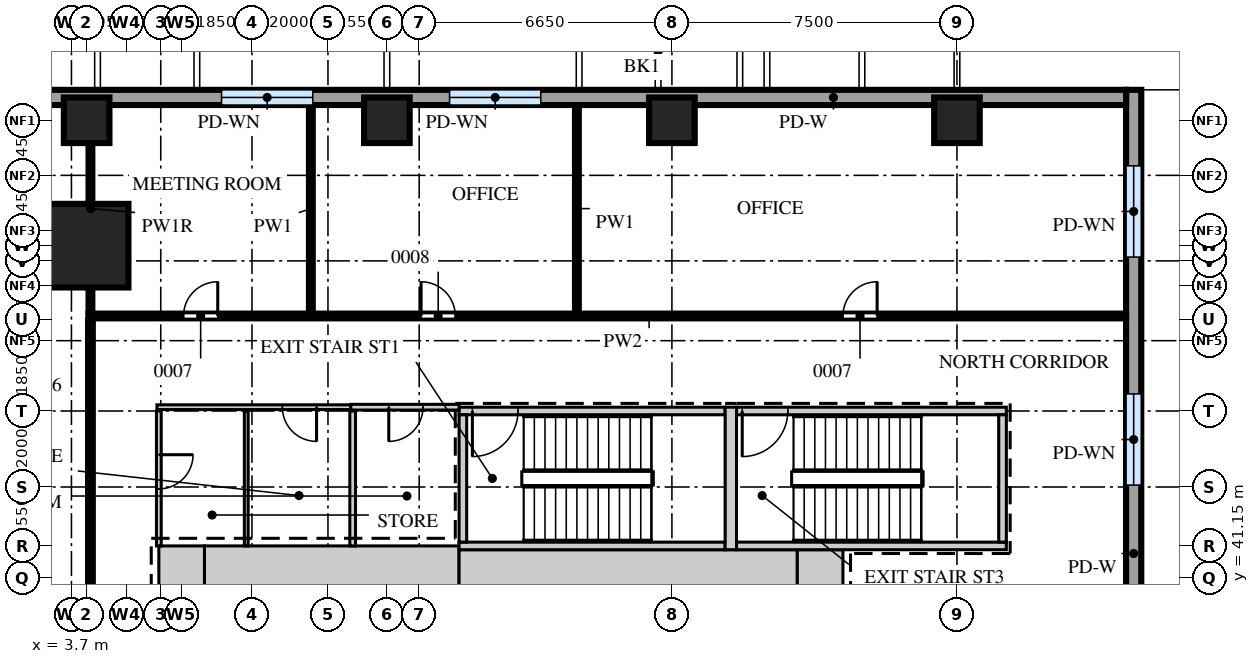
"""IFC4 building model, lengths in metres.
Left out: names, types, materials, properties, quantities, classifications, styles, units other than length and angle.
Written with IfcOpenShell. Run it as: python <this file> out.ifc"""

import sys

from ifc_helpers import new_model, si_unit, direction, frame, frame_2d, origin, origin_2d, place, context, subcontext, project, spatial, rectangle, extrude, source, transform, mapped, element, fill, save


model = new_model("IFC4")
c1 = context("Model", 3, precision=1e-05, world=origin(), true_north=direction((0.0, 1.0)))
c2 = subcontext(c1, "Body", "Model", "MODEL_VIEW")
j1 = project(units=[si_unit("LENGTHUNIT", "METRE"), si_unit("PLANEANGLEUNIT", "RADIAN")], contexts=[c1])
p1 = place(None, origin())
s1 = spatial("IfcSite", under=j1, at=p1, CompositionType="ELEMENT")
p2 = place(p1, origin())
s2 = spatial("IfcBuilding", under=s1, at=p2, CompositionType="ELEMENT")
p3 = place(p2, frame((0.0, 0.0, 28.5)))
s3 = spatial("IfcBuildingStorey", under=s2, at=p3, CompositionType="ELEMENT", Elevation=28.5)
m1 = source(origin(), c2, "Body", "SweptSolid", [
    extrude(rectangle(XDim=6.7, YDim=1.2, at=frame_2d((3.35, 0.0))), origin(), (0.0, 0.0, 1.0), 4.0),
])
p4 = place(p3, frame((7.2, 41.4, 0.0), z_axis=(0.0, 0.0, 1.0), x_axis=(1.0, 0.0, 0.0)))
e1 = element("IfcWall", 1, at=p4, inside=s3, PredefinedType="SHEAR", context=c2, shape_type="MappedRepresentation", body=[
    mapped(m1, transform((0.0, 0.0, 0.0))),
])
m2 = source(origin(), c2, "Body", "SweptSolid", [
    extrude(rectangle(XDim=8.9, YDim=1.1, at=frame_2d((4.45, 0.0))), origin(), (0.0, 0.0, 1.0), 4.0),
])
p5 = place(p3, frame((13.9, 41.35, 0.0), z_axis=(0.0, 0.0, 1.0), x_axis=(1.0, 0.0, 0.0)))
e2 = element("IfcWall", 2, at=p5, inside=s3, PredefinedType="SHEAR", context=c2, shape_type="MappedRepresentation", body=[
    mapped(m2, transform((0.0, 0.0, 0.0))),
])
m3 = source(origin(), c2, "Body", "SweptSolid", [
    extrude(rectangle(XDim=1.2, YDim=1.1, at=frame_2d((0.6, 0.0))), origin(), (0.0, 0.0, 1.0), 4.0),
])
p6 = place(p3, frame((22.8, 41.35, 0.0), z_axis=(0.0, 0.0, 1.0), x_axis=(1.0, 0.0, 0.0)))
e3 = element("IfcWall", 3, at=p6, inside=s3, PredefinedType="SHEAR", context=c2, shape_type="MappedRepresentation", body=[
    mapped(m3, transform((0.0, 0.0, 0.0))),
])
m4 = source(origin(), c2, "Body", "SweptSolid", [
    extrude(rectangle(XDim=1.2, YDim=1.2, at=frame_2d((0.6, 0.0))), origin(), (0.0, 0.0, 1.0), 4.0),
])
p7 = place(p3, frame((6.0, 41.4, 0.0), z_axis=(0.0, 0.0, 1.0), x_axis=(1.0, 0.0, 0.0)))
e4 = element("IfcWall", 4, at=p7, inside=s3, PredefinedType="SHEAR", context=c2, shape_type="MappedRepresentation", body=[
    mapped(m4, transform((0.0, 0.0, 0.0))),
])
m5 = source(origin(), c2, "Body", "SweptSolid", [
    extrude(rectangle(XDim=7.0, YDim=0.2, at=frame_2d((3.5, 0.0))), origin(), (0.0, 0.0, 1.0), 4.0),
])
p8 = place(p3, frame((13.9, 45.55, 0.0), z_axis=(0.0, 0.0, 1.0), x_axis=(1.0, 0.0, 0.0)))
e5 = element("IfcWall", 5, at=p8, inside=s3, PredefinedType="SHEAR", context=c2, shape_type="MappedRepresentation", body=[
    mapped(m5, transform((0.0, 0.0, 0.0))),
])
m6 = source(origin(), c2, "Body", "SweptSolid", [
    extrude(rectangle(XDim=1.2, YDim=2.1, at=frame_2d((0.6, 1.05))), frame((0.0, 0.11, 0.0), z_axis=(0.0, -1.0, 0.0), x_axis=(1.0, 0.0, 0.0)), (0.0, 0.0, 1.0), 0.22),
])
p9 = place(p8, frame((0.35, 0.0, 0.0)))
e6 = element("IfcOpeningElement", 6, at=p9, cuts=e5, PredefinedType="OPENING", context=c2, shape_type="MappedRepresentation", body=[
    mapped(m6, transform((0.0, 0.0, 0.0))),
])
p10 = place(p3, frame((13.9, 42.0, 0.0), z_axis=(0.0, 0.0, 1.0), x_axis=(1.0, 0.0, 0.0)))
e7 = element("IfcWall", 7, at=p10, inside=s3, PredefinedType="SHEAR", context=c2, shape_type="MappedRepresentation", body=[
    mapped(m5, transform((0.0, 0.0, 0.0))),
])
m7 = source(origin(), c2, "Body", "SweptSolid", [
    extrude(rectangle(XDim=7.1, YDim=0.2, at=frame_2d((3.55, 0.0))), origin(), (0.0, 0.0, 1.0), 4.0),
])
p11 = place(p3, frame((21.2, 45.55, 0.0), z_axis=(0.0, 0.0, 1.0), x_axis=(1.0, 0.0, 0.0)))
e8 = element("IfcWall", 8, at=p11, inside=s3, PredefinedType="SHEAR", context=c2, shape_type="MappedRepresentation", body=[
    mapped(m7, transform((0.0, 0.0, 0.0))),
])
p12 = place(p11, frame((0.15, 0.0, 0.0)))
e9 = element("IfcOpeningElement", 9, at=p12, cuts=e8, PredefinedType="OPENING", context=c2, shape_type="MappedRepresentation", body=[
    mapped(m6, transform((0.0, 0.0, 0.0))),
])
p13 = place(p3, frame((21.2, 42.0, 0.0), z_axis=(0.0, 0.0, 1.0), x_axis=(1.0, 0.0, 0.0)))
e10 = element("IfcWall", 10, at=p13, inside=s3, PredefinedType="SHEAR", context=c2, shape_type="MappedRepresentation", body=[
    mapped(m7, transform((0.0, 0.0, 0.0))),
])
m8 = source(origin(), c2, "Body", "SweptSolid", [
    extrude(rectangle(XDim=3.75, YDim=0.3, at=frame_2d((1.875, 0.0))), origin(), (0.0, 0.0, 1.0), 4.0),
])
p14 = place(p3, frame((21.05, 41.9, 0.0), z_axis=(0.0, 0.0, 1.0), x_axis=(0.0, 1.0, 0.0)))
e11 = element("IfcWall", 11, at=p14, inside=s3, PredefinedType="SHEAR", context=c2, shape_type="MappedRepresentation", body=[
    mapped(m8, transform((0.0, 0.0, 0.0))),
])
m9 = source(origin(), c2, "Body", "SweptSolid", [
    extrude(rectangle(XDim=3.35, YDim=0.2, at=frame_2d((1.675, 0.0))), origin(), (0.0, 0.0, 1.0), 4.0),
])
for number, where, z_axis, x_axis in (
    (12, (14.0, 42.1, 0.0), (0.0, 0.0, 1.0), (0.0, 1.0, 0.0)),
    (13, (28.2, 42.1, 0.0), (0.0, 0.0, 1.0), (0.0, 1.0, 0.0)),
):
    element("IfcWall", number, at=place(p3, frame(where, z_axis=z_axis, x_axis=x_axis)), inside=s3, PredefinedType="SHEAR", context=c2, shape_type="MappedRepresentation", body=[
        mapped(m9, transform((0.0, 0.0, 0.0))),
    ])
m10 = source(origin(), c2, "Body", "SweptSolid", [
    extrude(rectangle(XDim=2.2, YDim=2.2, at=origin_2d()), origin(), (0.0, 0.0, 1.0), 4.5),
])
p15 = place(p3, frame((4.1, 49.9, 0.0), z_axis=(0.0, 0.0, 1.0), x_axis=(1.0, 0.0, 0.0)))
e14 = element("IfcColumn", 14, at=p15, inside=s3, PredefinedType="COLUMN", context=c2, shape_type="MappedRepresentation", body=[
    mapped(m10, transform((0.0, 0.0, 0.0))),
])
m11 = source(origin(), c2, "Body", "SweptSolid", [
    extrude(rectangle(XDim=1.2, YDim=1.2, at=origin_2d()), origin(), (0.0, 0.0, 1.0), 4.0),
])
for number, where, z_axis, x_axis in (
    (15, (4.1, 53.2, 0.0), (0.0, 0.0, 1.0), (1.0, 0.0, 0.0)),
    (16, (12.0, 53.2, 0.0), (0.0, 0.0, 1.0), (1.0, 0.0, 0.0)),
    (17, (19.5, 53.2, 0.0), (0.0, 0.0, 1.0), (1.0, 0.0, 0.0)),
    (18, (27.0, 53.2, 0.0), (0.0, 0.0, 1.0), (1.0, 0.0, 0.0)),
):
    element("IfcColumn", number, at=place(p3, frame(where, z_axis=z_axis, x_axis=x_axis)), inside=s3, PredefinedType="COLUMN", context=c2, shape_type="MappedRepresentation", body=[
        mapped(m11, transform((0.0, 0.0, 0.0))),
    ])
m12 = source(origin(), c2, "Body", "SweptSolid", [
    extrude(rectangle(XDim=18.4, YDim=0.4, at=frame_2d((9.2, 0.0))), origin(), (0.0, 0.0, 1.0), 4.2),
])
p16 = place(p3, frame((31.65, 35.6, 0.0), z_axis=(0.0, 0.0, 1.0), x_axis=(0.0, 1.0, 0.0)))
e19 = element("IfcWall", 19, at=p16, inside=s3, PredefinedType="SOLIDWALL", context=c2, shape_type="MappedRepresentation", body=[
    mapped(m12, transform((0.0, 0.0, 0.0))),
])
m13 = source(origin(), c2, "Body", "SweptSolid", [
    extrude(rectangle(XDim=2.4, YDim=2.4, at=frame_2d((1.2, 1.2))), frame((0.0, 0.21, 0.0), z_axis=(0.0, -1.0, 0.0), x_axis=(1.0, 0.0, 0.0)), (0.0, 0.0, 1.0), 0.42),
])
p17 = place(p16, frame((2.0, 0.0, 1.0)))
e20 = element("IfcOpeningElement", 20, at=p17, cuts=e19, PredefinedType="OPENING", context=c2, shape_type="MappedRepresentation", body=[
    mapped(m13, transform((0.0, 0.0, 0.0))),
])
p18 = place(p16, frame((8.0, 0.0, 1.0)))
e21 = element("IfcOpeningElement", 21, at=p18, cuts=e19, PredefinedType="OPENING", context=c2, shape_type="MappedRepresentation", body=[
    mapped(m13, transform((0.0, 0.0, 0.0))),
])
p19 = place(p16, frame((14.0, 0.0, 1.0)))
e22 = element("IfcOpeningElement", 22, at=p19, cuts=e19, PredefinedType="OPENING", context=c2, shape_type="MappedRepresentation", body=[
    mapped(m13, transform((0.0, 0.0, 0.0))),
])
m14 = source(origin(), c2, "Body", "SweptSolid", [
    extrude(rectangle(XDim=33.24, YDim=0.4, at=frame_2d((16.62, 0.0))), origin(), (0.0, 0.0, 1.0), 4.2),
])
p20 = place(p3, frame((31.45, 53.8, 0.0), z_axis=(0.0, 0.0, 1.0), x_axis=(-1.0, 0.0, 0.0)))
e23 = element("IfcWall", 23, at=p20, inside=s3, PredefinedType="SOLIDWALL", context=c2, shape_type="MappedRepresentation", body=[
    mapped(m14, transform((0.0, 0.0, 0.0))),
])
p21 = place(p20, frame((15.4, 0.0, 1.0)))
e24 = element("IfcOpeningElement", 24, at=p21, cuts=e23, PredefinedType="OPENING", context=c2, shape_type="MappedRepresentation", body=[
    mapped(m13, transform((0.0, 0.0, 0.0))),
])
p22 = place(p20, frame((21.4, 0.0, 1.0)))
e25 = element("IfcOpeningElement", 25, at=p22, cuts=e23, PredefinedType="OPENING", context=c2, shape_type="MappedRepresentation", body=[
    mapped(m13, transform((0.0, 0.0, 0.0))),
])
m15 = source(origin(), c2, "Body", "SweptSolid", [
    extrude(rectangle(XDim=41.8, YDim=0.125, at=frame_2d((20.9, 0.0))), origin(), (0.0, 0.0, 1.0), 4.0),
])
p23 = place(p3, frame((4.2, 6.15, 0.0), z_axis=(0.0, 0.0, 1.0), x_axis=(0.0, 1.0, 0.0)))
e26 = element("IfcWall", 26, at=p23, inside=s3, PredefinedType="PARTITIONING", context=c2, shape_type="MappedRepresentation", body=[
    mapped(m15, transform((0.0, 0.0, 0.0))),
])
m16 = source(origin(), c2, "Body", "SweptSolid", [
    extrude(rectangle(XDim=1.2, YDim=2.1, at=frame_2d((0.6, 1.05))), frame((0.0, 0.073, 0.0), z_axis=(0.0, -1.0, 0.0), x_axis=(1.0, 0.0, 0.0)), (0.0, 0.0, 1.0), 0.145),
])
p24 = place(p23, frame((9.45, 0.0, 0.0)))
e27 = element("IfcOpeningElement", 27, at=p24, cuts=e26, PredefinedType="OPENING", context=c2, shape_type="MappedRepresentation", body=[
    mapped(m16, transform((0.0, 0.0, 0.0))),
])
p25 = place(p23, frame((28.05, 0.0, 0.0)))
e28 = element("IfcOpeningElement", 28, at=p25, cuts=e26, PredefinedType="OPENING", context=c2, shape_type="MappedRepresentation", body=[
    mapped(m16, transform((0.0, 0.0, 0.0))),
])
m17 = source(origin(), c2, "Body", "SweptSolid", [
    extrude(rectangle(XDim=3.55, YDim=0.125, at=frame_2d((1.775, 0.0))), origin(), (0.0, 0.0, 1.0), 4.0),
])
p26 = place(p3, frame((6.0, 42.0, 0.0), z_axis=(0.0, 0.0, 1.0), x_axis=(0.0, 1.0, 0.0)))
e29 = element("IfcWall", 29, at=p26, inside=s3, PredefinedType="PARTITIONING", context=c2, shape_type="MappedRepresentation", body=[
    mapped(m17, transform((0.0, 0.0, 0.0))),
])
m18 = source(origin(), c2, "Body", "SweptSolid", [
    extrude(rectangle(XDim=0.9, YDim=2.1, at=frame_2d((0.45, 1.05))), frame((0.0, 0.073, 0.0), z_axis=(0.0, -1.0, 0.0), x_axis=(1.0, 0.0, 0.0)), (0.0, 0.0, 1.0), 0.145),
])
p27 = place(p26, frame((1.5, 0.0, 0.0)))
e30 = element("IfcOpeningElement", 30, at=p27, cuts=e29, PredefinedType="OPENING", context=c2, shape_type="MappedRepresentation", body=[
    mapped(m18, transform((0.0, 0.0, 0.0))),
])
m19 = source(origin(), c2, "Body", "SweptSolid", [
    extrude(rectangle(XDim=3.55, YDim=0.1, at=frame_2d((1.775, 0.0))), origin(), (0.0, 0.0, 1.0), 4.0),
])
p28 = place(p3, frame((8.3, 42.0, 0.0), z_axis=(0.0, 0.0, 1.0), x_axis=(0.0, 1.0, 0.0)))
e31 = element("IfcWall", 31, at=p28, inside=s3, PredefinedType="PARTITIONING", context=c2, shape_type="MappedRepresentation", body=[
    mapped(m19, transform((0.0, 0.0, 0.0))),
])
m20 = source(origin(), c2, "Body", "SweptSolid", [
    extrude(rectangle(XDim=3.55, YDim=0.15, at=frame_2d((1.775, 0.0))), origin(), (0.0, 0.0, 1.0), 4.0),
])
p29 = place(p3, frame((11.1, 42.0, 0.0), z_axis=(0.0, 0.0, 1.0), x_axis=(0.0, 1.0, 0.0)))
e32 = element("IfcWall", 32, at=p29, inside=s3, PredefinedType="PARTITIONING", context=c2, shape_type="MappedRepresentation", body=[
    mapped(m20, transform((0.0, 0.0, 0.0))),
])
m21 = source(origin(), c2, "Body", "SweptSolid", [
    extrude(rectangle(XDim=5.1, YDim=0.125, at=frame_2d((2.55, 0.0))), origin(), (0.0, 0.0, 1.0), 4.0),
])
p30 = place(p3, frame((5.95, 45.65, 0.0), z_axis=(0.0, 0.0, 1.0), x_axis=(1.0, 0.0, 0.0)))
e33 = element("IfcWall", 33, at=p30, inside=s3, PredefinedType="PARTITIONING", context=c2, shape_type="MappedRepresentation", body=[
    mapped(m21, transform((0.0, 0.0, 0.0))),
])
p31 = place(p30, frame((3.3, 0.0, 0.0)))
e34 = element("IfcOpeningElement", 34, at=p31, cuts=e33, PredefinedType="OPENING", context=c2, shape_type="MappedRepresentation", body=[
    mapped(m18, transform((0.0, 0.0, 0.0))),
])
m22 = source(origin(), c2, "Body", "SweptSolid", [
    extrude(rectangle(XDim=2.85, YDim=0.15, at=frame_2d((1.425, 0.0))), origin(), (0.0, 0.0, 1.0), 4.0),
])
p32 = place(p3, frame((11.05, 45.65, 0.0), z_axis=(0.0, 0.0, 1.0), x_axis=(1.0, 0.0, 0.0)))
e35 = element("IfcWall", 35, at=p32, inside=s3, PredefinedType="PARTITIONING", context=c2, shape_type="MappedRepresentation", body=[
    mapped(m22, transform((0.0, 0.0, 0.0))),
])
m23 = source(origin(), c2, "Body", "SweptSolid", [
    extrude(rectangle(XDim=0.9, YDim=2.1, at=frame_2d((0.45, 1.05))), frame((0.0, 0.085, 0.0), z_axis=(0.0, -1.0, 0.0), x_axis=(1.0, 0.0, 0.0)), (0.0, 0.0, 1.0), 0.17),
])
p33 = place(p32, frame((1.0, 0.0, 0.0)))
e36 = element("IfcOpeningElement", 36, at=p33, cuts=e35, PredefinedType="OPENING", context=c2, shape_type="MappedRepresentation", body=[
    mapped(m23, transform((0.0, 0.0, 0.0))),
])
m24 = source(origin(), c2, "Body", "SweptSolid", [
    extrude(rectangle(XDim=27.3, YDim=0.125, at=frame_2d((13.65, 0.0))), origin(), (0.0, 0.0, 1.0), 4.0),
])
p34 = place(p3, frame((4.15, 48.05, 0.0), z_axis=(0.0, 0.0, 1.0), x_axis=(1.0, 0.0, 0.0)))
e37 = element("IfcWall", 37, at=p34, inside=s3, PredefinedType="PARTITIONING", context=c2, shape_type="MappedRepresentation", body=[
    mapped(m24, transform((0.0, 0.0, 0.0))),
])
p35 = place(p34, frame((2.5, 0.0, 0.0)))
e38 = element("IfcOpeningElement", 38, at=p35, cuts=e37, PredefinedType="OPENING", context=c2, shape_type="MappedRepresentation", body=[
    mapped(m18, transform((0.0, 0.0, 0.0))),
])
p36 = place(p34, frame((8.75, 0.0, 0.0)))
e39 = element("IfcOpeningElement", 39, at=p36, cuts=e37, PredefinedType="OPENING", context=c2, shape_type="MappedRepresentation", body=[
    mapped(m18, transform((0.0, 0.0, 0.0))),
])
p37 = place(p34, frame((19.85, 0.0, 0.0)))
e40 = element("IfcOpeningElement", 40, at=p37, cuts=e37, PredefinedType="OPENING", context=c2, shape_type="MappedRepresentation", body=[
    mapped(m18, transform((0.0, 0.0, 0.0))),
])
m25 = source(origin(), c2, "Body", "SweptSolid", [
    extrude(rectangle(XDim=5.45, YDim=0.1, at=frame_2d((2.725, 0.0))), origin(), (0.0, 0.0, 1.0), 3.4),
])
p38 = place(p3, frame((4.2, 48.15, 0.0), z_axis=(0.0, 0.0, 1.0), x_axis=(0.0, 1.0, 0.0)))
e41 = element("IfcWall", 41, at=p38, inside=s3, PredefinedType="PARTITIONING", context=c2, shape_type="MappedRepresentation", body=[
    mapped(m25, transform((0.0, 0.0, 0.0))),
])
m26 = source(origin(), c2, "Body", "SweptSolid", [
    extrude(rectangle(XDim=5.45, YDim=0.1, at=frame_2d((2.725, 0.0))), origin(), (0.0, 0.0, 1.0), 4.0),
])
for number, where, z_axis, x_axis in (
    (42, (10.0, 48.15, 0.0), (0.0, 0.0, 1.0), (0.0, 1.0, 0.0)),
    (43, (17.0, 48.15, 0.0), (0.0, 0.0, 1.0), (0.0, 1.0, 0.0)),
):
    element("IfcWall", number, at=place(p3, frame(where, z_axis=z_axis, x_axis=x_axis)), inside=s3, PredefinedType="PARTITIONING", context=c2, shape_type="MappedRepresentation", body=[
        mapped(m26, transform((0.0, 0.0, 0.0))),
    ])
m27 = source(origin(), c2, "Body", "SweptSolid", [
    extrude(rectangle(XDim=2.4, YDim=2.4, at=frame_2d((1.2, 1.2))), frame((0.0, 0.03, 0.0), z_axis=(0.0, -1.0, 0.0), x_axis=(1.0, 0.0, 0.0)), (0.0, 0.0, 1.0), 0.06),
])
p39 = place(p18, origin())
e44 = element("IfcWindow", 44, at=p39, inside=s3, PartitioningType="SINGLE_PANEL", PredefinedType="WINDOW", context=c2, shape_type="MappedRepresentation", body=[
    mapped(m27, transform((0.0, 0.0, 0.0))),
])
fill(e21, e44)
p40 = place(p19, origin())
e45 = element("IfcWindow", 45, at=p40, inside=s3, PartitioningType="SINGLE_PANEL", PredefinedType="WINDOW", context=c2, shape_type="MappedRepresentation", body=[
    mapped(m27, transform((0.0, 0.0, 0.0))),
])
fill(e22, e45)
p41 = place(p21, origin())
e46 = element("IfcWindow", 46, at=p41, inside=s3, PartitioningType="SINGLE_PANEL", PredefinedType="WINDOW", context=c2, shape_type="MappedRepresentation", body=[
    mapped(m27, transform((0.0, 0.0, 0.0))),
])
fill(e24, e46)
p42 = place(p22, origin())
e47 = element("IfcWindow", 47, at=p42, inside=s3, PartitioningType="SINGLE_PANEL", PredefinedType="WINDOW", context=c2, shape_type="MappedRepresentation", body=[
    mapped(m27, transform((0.0, 0.0, 0.0))),
])
fill(e25, e47)
m28 = source(origin(), c2, "Body", "SweptSolid", [
    extrude(rectangle(XDim=0.9, YDim=2.1, at=frame_2d((0.45, 1.05))), frame((0.0, 0.025, 0.0), z_axis=(0.0, -1.0, 0.0), x_axis=(1.0, 0.0, 0.0)), (0.0, 0.0, 1.0), 0.05),
])
p43 = place(p35, origin())
e48 = element("IfcDoor", 48, at=p43, inside=s3, OperationType="SINGLE_SWING_LEFT", PredefinedType="DOOR", context=c2, shape_type="MappedRepresentation", body=[
    mapped(m28, transform((0.0, 0.0, 0.0))),
])
fill(e38, e48)
p44 = place(p36, origin())
e49 = element("IfcDoor", 49, at=p44, inside=s3, OperationType="SINGLE_SWING_RIGHT", PredefinedType="DOOR", context=c2, shape_type="MappedRepresentation", body=[
    mapped(m28, transform((0.0, 0.0, 0.0))),
])
fill(e39, e49)
p45 = place(p37, origin())
e50 = element("IfcDoor", 50, at=p45, inside=s3, OperationType="SINGLE_SWING_LEFT", PredefinedType="DOOR", context=c2, shape_type="MappedRepresentation", body=[
    mapped(m28, transform((0.0, 0.0, 0.0))),
])
fill(e40, e50)
p46 = place(p27, origin())
e51 = element("IfcDoor", 51, at=p46, inside=s3, OperationType="SINGLE_SWING_RIGHT", PredefinedType="DOOR", context=c2, shape_type="MappedRepresentation", body=[
    mapped(m28, transform((0.0, 0.0, 0.0))),
])
fill(e30, e51)
p47 = place(p31, origin())
e52 = element("IfcDoor", 52, at=p47, inside=s3, OperationType="SINGLE_SWING_RIGHT", PredefinedType="DOOR", context=c2, shape_type="MappedRepresentation", body=[
    mapped(m28, transform((0.0, 0.0, 0.0))),
])
fill(e34, e52)
p48 = place(p33, origin())
e53 = element("IfcDoor", 53, at=p48, inside=s3, OperationType="SINGLE_SWING_LEFT", PredefinedType="DOOR", context=c2, shape_type="MappedRepresentation", body=[
    mapped(m28, transform((0.0, 0.0, 0.0))),
])
fill(e36, e53)
m29 = source(origin(), c2, "Body", "SweptSolid", [
    extrude(rectangle(XDim=1.2, YDim=2.1, at=frame_2d((0.6, 1.05))), frame((0.0, 0.025, 0.0), z_axis=(0.0, -1.0, 0.0), x_axis=(1.0, 0.0, 0.0)), (0.0, 0.0, 1.0), 0.05),
])
p49 = place(p9, origin())
e54 = element("IfcDoor", 54, at=p49, inside=s3, OperationType="SINGLE_SWING_LEFT", PredefinedType="DOOR", context=c2, shape_type="MappedRepresentation", body=[
    mapped(m29, transform((0.0, 0.0, 0.0))),
])
fill(e6, e54)
p50 = place(p12, origin())
e55 = element("IfcDoor", 55, at=p50, inside=s3, OperationType="SINGLE_SWING_LEFT", PredefinedType="DOOR", context=c2, shape_type="MappedRepresentation", body=[
    mapped(m29, transform((0.0, 0.0, 0.0))),
])
fill(e9, e55)
save(model, sys.argv[1])
